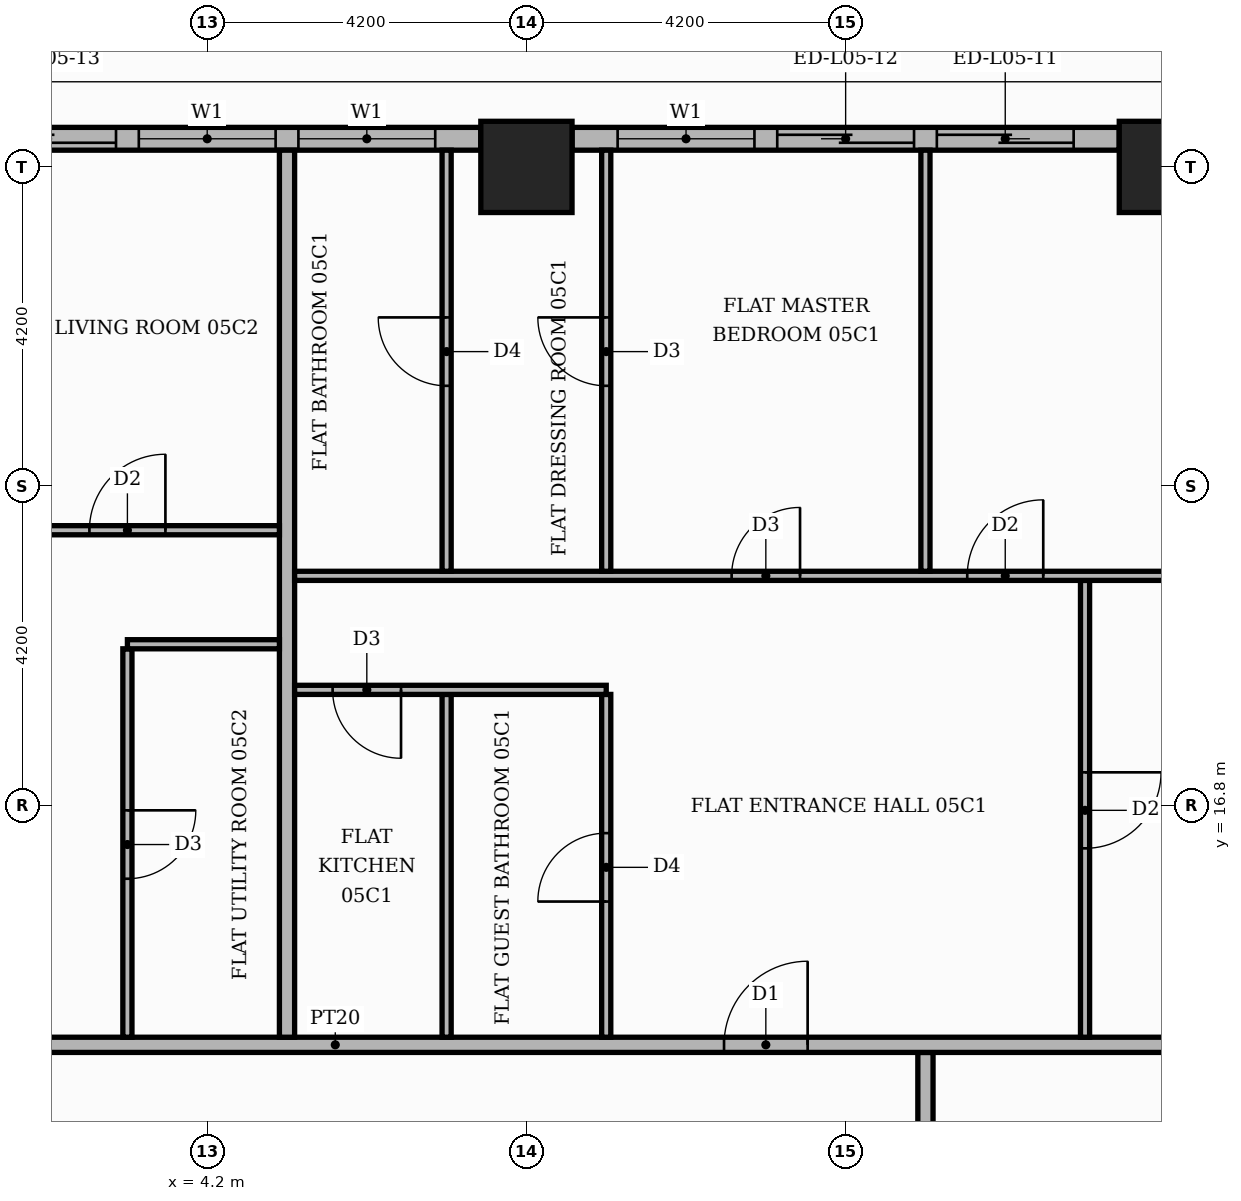
"""IFC4 building model, lengths in metres.
Left out: names, types, materials, properties, quantities, classifications, styles, units other than length and angle.
Written with IfcOpenShell. Run it as: python <this file> out.ifc"""

import sys

from ifc_helpers import new_model, si_unit, direction, frame, frame_2d, origin, origin_2d, place, context, subcontext, project, spatial, rectangle, extrude, element, fill, save


model = new_model("IFC4")
c1 = context("Model", 3, precision=1e-05, world=origin(), true_north=direction((0.0, 1.0)))
c2 = subcontext(c1, "Body", "Model", "MODEL_VIEW")
j1 = project(units=[si_unit("LENGTHUNIT", "METRE"), si_unit("PLANEANGLEUNIT", "RADIAN")], contexts=[c1])
p1 = place(None, origin())
s1 = spatial("IfcSite", under=j1, at=p1, CompositionType="ELEMENT")
p2 = place(p1, origin())
s2 = spatial("IfcBuilding", under=s1, at=p2, CompositionType="ELEMENT")
p3 = place(p2, frame((0.0, 0.0, 27.0)))
s3 = spatial("IfcBuildingStorey", under=s2, at=p3, CompositionType="ELEMENT", Elevation=27.0)
for number, where, z_axis, x_axis in (
    (1, (8.4, 25.2, 0.0), (0.0, 0.0, 1.0), (1.0, 0.0, 0.0)),
    (2, (16.8, 25.2, 0.0), (0.0, 0.0, 1.0), (1.0, 0.0, 0.0)),
):
    element("IfcColumn", number, at=place(p3, frame(where, z_axis=z_axis, x_axis=x_axis)), inside=s3, PredefinedType="COLUMN", context=c2, shape_type="SweptSolid", body=[
        extrude(rectangle(XDim=1.2, YDim=1.2, at=origin_2d()), origin(), (0.0, 0.0, 1.0), 3.9),
    ])
p4 = place(p3, frame((16.2, 25.57, 0.0), z_axis=(0.0, 0.0, 1.0), x_axis=(-1.0, 0.0, 0.0)))
e3 = element("IfcWall", 3, at=p4, inside=s3, PredefinedType="STANDARD", context=c2, shape_type="SweptSolid", body=[
    extrude(rectangle(XDim=7.2, YDim=0.3, at=frame_2d((3.6, 0.0))), origin(), (0.0, 0.0, 1.0), 3.48),
])
p5 = place(p4, frame((0.6, 0.0, 0.0)))
e4 = element("IfcOpeningElement", 4, at=p5, cuts=e3, PredefinedType="OPENING", context=c2, shape_type="SweptSolid", body=[
    extrude(rectangle(XDim=1.8, YDim=2.4, at=frame_2d((0.9, 1.2))), frame((0.0, 0.16, 0.0), z_axis=(0.0, -1.0, 0.0), x_axis=(1.0, 0.0, 0.0)), (0.0, 0.0, 1.0), 0.32),
])
p6 = place(p4, frame((2.7, 0.0, 0.0)))
e5 = element("IfcOpeningElement", 5, at=p6, cuts=e3, PredefinedType="OPENING", context=c2, shape_type="SweptSolid", body=[
    extrude(rectangle(XDim=1.8, YDim=2.4, at=frame_2d((0.9, 1.2))), frame((0.0, 0.16, 0.0), z_axis=(0.0, -1.0, 0.0), x_axis=(1.0, 0.0, 0.0)), (0.0, 0.0, 1.0), 0.32),
])
p7 = place(p4, frame((4.8, 0.0, 0.9)))
e6 = element("IfcOpeningElement", 6, at=p7, cuts=e3, PredefinedType="OPENING", context=c2, shape_type="SweptSolid", body=[
    extrude(rectangle(XDim=1.8, YDim=2.1, at=frame_2d((0.9, 1.05))), frame((0.0, 0.16, 0.0), z_axis=(0.0, -1.0, 0.0), x_axis=(1.0, 0.0, 0.0)), (0.0, 0.0, 1.0), 0.32),
])
p8 = place(p3, frame((7.8, 25.57, 0.0), z_axis=(0.0, 0.0, 1.0), x_axis=(-1.0, 0.0, 0.0)))
e7 = element("IfcWall", 7, at=p8, inside=s3, PredefinedType="STANDARD", context=c2, shape_type="SweptSolid", body=[
    extrude(rectangle(XDim=7.2, YDim=0.3, at=frame_2d((3.6, 0.0))), origin(), (0.0, 0.0, 1.0), 3.48),
])
p9 = place(p8, frame((0.6, 0.0, 0.9)))
e8 = element("IfcOpeningElement", 8, at=p9, cuts=e7, PredefinedType="OPENING", context=c2, shape_type="SweptSolid", body=[
    extrude(rectangle(XDim=1.8, YDim=2.1, at=frame_2d((0.9, 1.05))), frame((0.0, 0.16, 0.0), z_axis=(0.0, -1.0, 0.0), x_axis=(1.0, 0.0, 0.0)), (0.0, 0.0, 1.0), 0.32),
])
p10 = place(p8, frame((2.7, 0.0, 0.9)))
e9 = element("IfcOpeningElement", 9, at=p10, cuts=e7, PredefinedType="OPENING", context=c2, shape_type="SweptSolid", body=[
    extrude(rectangle(XDim=1.8, YDim=2.1, at=frame_2d((0.9, 1.05))), frame((0.0, 0.16, 0.0), z_axis=(0.0, -1.0, 0.0), x_axis=(1.0, 0.0, 0.0)), (0.0, 0.0, 1.0), 0.32),
])
p11 = place(p8, frame((4.8, 0.0, 0.0)))
e10 = element("IfcOpeningElement", 10, at=p11, cuts=e7, PredefinedType="OPENING", context=c2, shape_type="SweptSolid", body=[
    extrude(rectangle(XDim=1.8, YDim=2.4, at=frame_2d((0.9, 1.2))), frame((0.0, 0.16, 0.0), z_axis=(0.0, -1.0, 0.0), x_axis=(1.0, 0.0, 0.0)), (0.0, 0.0, 1.0), 0.32),
])
p12 = place(p3, frame((13.65, -5.15, 0.0), z_axis=(0.0, 0.0, 1.0), x_axis=(0.0, 1.0, 0.0)))
e11 = element("IfcWall", 11, at=p12, inside=s3, PredefinedType="PARTITIONING", context=c2, shape_type="SweptSolid", body=[
    extrude(rectangle(XDim=18.7, YDim=0.2, at=frame_2d((9.35, 0.0))), origin(), (0.0, 0.0, 1.0), 3.48),
])
p13 = place(p12, frame((3.55, 0.0, 0.0)))
e12 = element("IfcOpeningElement", 12, at=p13, cuts=e11, PredefinedType="OPENING", context=c2, shape_type="SweptSolid", body=[
    extrude(rectangle(XDim=1.1, YDim=2.4, at=frame_2d((0.55, 1.2))), frame((0.0, 0.11, 0.0), z_axis=(0.0, -1.0, 0.0), x_axis=(1.0, 0.0, 0.0)), (0.0, 0.0, 1.0), 0.22),
])
p14 = place(p3, frame((-13.65, 13.65, 0.0), z_axis=(0.0, 0.0, 1.0), x_axis=(1.0, 0.0, 0.0)))
e13 = element("IfcWall", 13, at=p14, inside=s3, PredefinedType="PARTITIONING", context=c2, shape_type="SweptSolid", body=[
    extrude(rectangle(XDim=39.07, YDim=0.2, at=frame_2d((19.535, 0.0))), origin(), (0.0, 0.0, 1.0), 3.48),
])
p15 = place(p14, frame((24.65, 0.0, 0.0)))
e14 = element("IfcOpeningElement", 14, at=p15, cuts=e13, PredefinedType="OPENING", context=c2, shape_type="SweptSolid", body=[
    extrude(rectangle(XDim=1.1, YDim=2.4, at=frame_2d((0.55, 1.2))), frame((0.0, 0.11, 0.0), z_axis=(0.0, -1.0, 0.0), x_axis=(1.0, 0.0, 0.0)), (0.0, 0.0, 1.0), 0.22),
])
p16 = place(p14, frame((14.15, 0.0, 0.0)))
e15 = element("IfcOpeningElement", 15, at=p16, cuts=e13, PredefinedType="OPENING", context=c2, shape_type="SweptSolid", body=[
    extrude(rectangle(XDim=1.1, YDim=2.4, at=frame_2d((0.55, 1.2))), frame((0.0, 0.11, 0.0), z_axis=(0.0, -1.0, 0.0), x_axis=(1.0, 0.0, 0.0)), (0.0, 0.0, 1.0), 0.22),
])
p17 = place(p3, frame((3.15, 13.75, 0.0), z_axis=(0.0, 0.0, 1.0), x_axis=(0.0, 1.0, 0.0)))
e16 = element("IfcWall", 16, at=p17, inside=s3, PredefinedType="PARTITIONING", context=c2, shape_type="SweptSolid", body=[
    extrude(rectangle(XDim=5.11, YDim=0.12, at=frame_2d((2.555, 0.0))), origin(), (0.0, 0.0, 1.0), 3.48),
])
p18 = place(p17, frame((2.085, 0.0, 0.0)))
e17 = element("IfcOpeningElement", 17, at=p18, cuts=e16, PredefinedType="OPENING", context=c2, shape_type="SweptSolid", body=[
    extrude(rectangle(XDim=0.9, YDim=2.1, at=frame_2d((0.45, 1.05))), frame((0.0, 0.07, 0.0), z_axis=(0.0, -1.0, 0.0), x_axis=(1.0, 0.0, 0.0)), (0.0, 0.0, 1.0), 0.14),
])
p19 = place(p3, frame((5.25, 13.75, 0.0), z_axis=(0.0, 0.0, 1.0), x_axis=(0.0, 1.0, 0.0)))
e18 = element("IfcWall", 18, at=p19, inside=s3, PredefinedType="PARTITIONING", context=c2, shape_type="SweptSolid", body=[
    extrude(rectangle(XDim=11.67, YDim=0.2, at=frame_2d((5.835, 0.0))), origin(), (0.0, 0.0, 1.0), 3.48),
])
p20 = place(p3, frame((7.35, 13.75, 0.0), z_axis=(0.0, 0.0, 1.0), x_axis=(0.0, 1.0, 0.0)))
e19 = element("IfcWall", 19, at=p20, inside=s3, PredefinedType="PARTITIONING", context=c2, shape_type="SweptSolid", body=[
    extrude(rectangle(XDim=4.51, YDim=0.12, at=frame_2d((2.255, 0.0))), origin(), (0.0, 0.0, 1.0), 3.48),
])
p21 = place(p3, frame((9.45, 13.75, 0.0), z_axis=(0.0, 0.0, 1.0), x_axis=(0.0, 1.0, 0.0)))
e20 = element("IfcWall", 20, at=p21, inside=s3, PredefinedType="PARTITIONING", context=c2, shape_type="SweptSolid", body=[
    extrude(rectangle(XDim=4.51, YDim=0.12, at=frame_2d((2.255, 0.0))), origin(), (0.0, 0.0, 1.0), 3.48),
])
p22 = place(p21, frame((1.785, 0.0, 0.0)))
e21 = element("IfcOpeningElement", 21, at=p22, cuts=e20, PredefinedType="OPENING", context=c2, shape_type="SweptSolid", body=[
    extrude(rectangle(XDim=0.9, YDim=2.1, at=frame_2d((0.45, 1.05))), frame((0.0, 0.07, 0.0), z_axis=(0.0, -1.0, 0.0), x_axis=(1.0, 0.0, 0.0)), (0.0, 0.0, 1.0), 0.14),
])
p23 = place(p3, frame((15.75, 13.75, 0.0), z_axis=(0.0, 0.0, 1.0), x_axis=(0.0, 1.0, 0.0)))
e22 = element("IfcWall", 22, at=p23, inside=s3, PredefinedType="PARTITIONING", context=c2, shape_type="SweptSolid", body=[
    extrude(rectangle(XDim=6.01, YDim=0.12, at=frame_2d((3.005, 0.0))), origin(), (0.0, 0.0, 1.0), 3.48),
])
p24 = place(p23, frame((2.485, 0.0, 0.0)))
e23 = element("IfcOpeningElement", 23, at=p24, cuts=e22, PredefinedType="OPENING", context=c2, shape_type="SweptSolid", body=[
    extrude(rectangle(XDim=1.0, YDim=2.1, at=frame_2d((0.5, 1.05))), frame((0.0, 0.07, 0.0), z_axis=(0.0, -1.0, 0.0), x_axis=(1.0, 0.0, 0.0)), (0.0, 0.0, 1.0), 0.14),
])
p25 = place(p3, frame((5.35, 18.32, 0.0), z_axis=(0.0, 0.0, 1.0), x_axis=(1.0, 0.0, 0.0)))
e24 = element("IfcWall", 24, at=p25, inside=s3, PredefinedType="PARTITIONING", context=c2, shape_type="SweptSolid", body=[
    extrude(rectangle(XDim=4.1, YDim=0.12, at=frame_2d((2.05, 0.0))), origin(), (0.0, 0.0, 1.0), 3.48),
])
p26 = place(p25, frame((0.5, 0.0, 0.0)))
e25 = element("IfcOpeningElement", 25, at=p26, cuts=e24, PredefinedType="OPENING", context=c2, shape_type="SweptSolid", body=[
    extrude(rectangle(XDim=0.9, YDim=2.1, at=frame_2d((0.45, 1.05))), frame((0.0, 0.07, 0.0), z_axis=(0.0, -1.0, 0.0), x_axis=(1.0, 0.0, 0.0)), (0.0, 0.0, 1.0), 0.14),
])
p27 = place(p3, frame((3.15, 18.92, 0.0), z_axis=(0.0, 0.0, 1.0), x_axis=(1.0, 0.0, 0.0)))
e26 = element("IfcWall", 26, at=p27, inside=s3, PredefinedType="PARTITIONING", context=c2, shape_type="SweptSolid", body=[
    extrude(rectangle(XDim=2.0, YDim=0.12, at=frame_2d((1.0, 0.0))), origin(), (0.0, 0.0, 1.0), 3.48),
])
p28 = place(p3, frame((5.35, 19.82, 0.0), z_axis=(0.0, 0.0, 1.0), x_axis=(1.0, 0.0, 0.0)))
e27 = element("IfcWall", 27, at=p28, inside=s3, PredefinedType="PARTITIONING", context=c2, shape_type="SweptSolid", body=[
    extrude(rectangle(XDim=11.95, YDim=0.12, at=frame_2d((5.975, 0.0))), origin(), (0.0, 0.0, 1.0), 3.48),
])
p29 = place(p28, frame((8.85, 0.0, 0.0)))
e28 = element("IfcOpeningElement", 28, at=p29, cuts=e27, PredefinedType="OPENING", context=c2, shape_type="SweptSolid", body=[
    extrude(rectangle(XDim=1.0, YDim=2.1, at=frame_2d((0.5, 1.05))), frame((0.0, 0.07, 0.0), z_axis=(0.0, -1.0, 0.0), x_axis=(1.0, 0.0, 0.0)), (0.0, 0.0, 1.0), 0.14),
])
p30 = place(p28, frame((5.75, 0.0, 0.0)))
e29 = element("IfcOpeningElement", 29, at=p30, cuts=e27, PredefinedType="OPENING", context=c2, shape_type="SweptSolid", body=[
    extrude(rectangle(XDim=0.9, YDim=2.1, at=frame_2d((0.45, 1.05))), frame((0.0, 0.07, 0.0), z_axis=(0.0, -1.0, 0.0), x_axis=(1.0, 0.0, 0.0)), (0.0, 0.0, 1.0), 0.14),
])
p31 = place(p3, frame((7.35, 19.88, 0.0), z_axis=(0.0, 0.0, 1.0), x_axis=(0.0, 1.0, 0.0)))
e30 = element("IfcWall", 30, at=p31, inside=s3, PredefinedType="PARTITIONING", context=c2, shape_type="SweptSolid", body=[
    extrude(rectangle(XDim=5.54, YDim=0.12, at=frame_2d((2.77, 0.0))), origin(), (0.0, 0.0, 1.0), 3.48),
])
p32 = place(p31, frame((2.44, 0.0, 0.0)))
e31 = element("IfcOpeningElement", 31, at=p32, cuts=e30, PredefinedType="OPENING", context=c2, shape_type="SweptSolid", body=[
    extrude(rectangle(XDim=0.9, YDim=2.1, at=frame_2d((0.45, 1.05))), frame((0.0, 0.07, 0.0), z_axis=(0.0, -1.0, 0.0), x_axis=(1.0, 0.0, 0.0)), (0.0, 0.0, 1.0), 0.14),
])
p33 = place(p3, frame((9.45, 19.88, 0.0), z_axis=(0.0, 0.0, 1.0), x_axis=(0.0, 1.0, 0.0)))
e32 = element("IfcWall", 32, at=p33, inside=s3, PredefinedType="PARTITIONING", context=c2, shape_type="SweptSolid", body=[
    extrude(rectangle(XDim=5.54, YDim=0.12, at=frame_2d((2.77, 0.0))), origin(), (0.0, 0.0, 1.0), 3.48),
])
p34 = place(p33, frame((2.44, 0.0, 0.0)))
e33 = element("IfcOpeningElement", 33, at=p34, cuts=e32, PredefinedType="OPENING", context=c2, shape_type="SweptSolid", body=[
    extrude(rectangle(XDim=0.9, YDim=2.1, at=frame_2d((0.45, 1.05))), frame((0.0, 0.07, 0.0), z_axis=(0.0, -1.0, 0.0), x_axis=(1.0, 0.0, 0.0)), (0.0, 0.0, 1.0), 0.14),
])
p35 = place(p3, frame((13.65, 19.88, 0.0), z_axis=(0.0, 0.0, 1.0), x_axis=(0.0, 1.0, 0.0)))
e34 = element("IfcWall", 34, at=p35, inside=s3, PredefinedType="PARTITIONING", context=c2, shape_type="SweptSolid", body=[
    extrude(rectangle(XDim=5.54, YDim=0.12, at=frame_2d((2.77, 0.0))), origin(), (0.0, 0.0, 1.0), 3.48),
])
p36 = place(p3, frame((-13.55, 20.42, 0.0), z_axis=(0.0, 0.0, 1.0), x_axis=(1.0, 0.0, 0.0)))
e35 = element("IfcWall", 35, at=p36, inside=s3, PredefinedType="PARTITIONING", context=c2, shape_type="SweptSolid", body=[
    extrude(rectangle(XDim=18.7, YDim=0.12, at=frame_2d((9.35, 0.0))), origin(), (0.0, 0.0, 1.0), 3.48),
])
p37 = place(p36, frame((16.2, 0.0, 0.0)))
e36 = element("IfcOpeningElement", 36, at=p37, cuts=e35, PredefinedType="OPENING", context=c2, shape_type="SweptSolid", body=[
    extrude(rectangle(XDim=1.0, YDim=2.1, at=frame_2d((0.5, 1.05))), frame((0.0, 0.07, 0.0), z_axis=(0.0, -1.0, 0.0), x_axis=(1.0, 0.0, 0.0)), (0.0, 0.0, 1.0), 0.14),
])
p38 = place(p36, frame((12.05, 0.0, 0.0)))
e37 = element("IfcOpeningElement", 37, at=p38, cuts=e35, PredefinedType="OPENING", context=c2, shape_type="SweptSolid", body=[
    extrude(rectangle(XDim=0.9, YDim=2.1, at=frame_2d((0.45, 1.05))), frame((0.0, 0.07, 0.0), z_axis=(0.0, -1.0, 0.0), x_axis=(1.0, 0.0, 0.0)), (0.0, 0.0, 1.0), 0.14),
])
p39 = place(p36, frame((3.65, 0.0, 0.0)))
e38 = element("IfcOpeningElement", 38, at=p39, cuts=e35, PredefinedType="OPENING", context=c2, shape_type="SweptSolid", body=[
    extrude(rectangle(XDim=0.9, YDim=2.1, at=frame_2d((0.45, 1.05))), frame((0.0, 0.07, 0.0), z_axis=(0.0, -1.0, 0.0), x_axis=(1.0, 0.0, 0.0)), (0.0, 0.0, 1.0), 0.14),
])
p40 = place(p5, origin())
e39 = element("IfcDoor", 39, at=p40, inside=s3, OperationType="SLIDING_TO_LEFT", PredefinedType="DOOR", context=c2, shape_type="SweptSolid", body=[
    extrude(rectangle(XDim=1.8, YDim=2.4, at=frame_2d((0.9, 1.2))), frame((0.0, 0.025, 0.0), z_axis=(0.0, -1.0, 0.0), x_axis=(1.0, 0.0, 0.0)), (0.0, 0.0, 1.0), 0.05),
])
fill(e4, e39)
p41 = place(p6, origin())
e40 = element("IfcDoor", 40, at=p41, inside=s3, OperationType="SLIDING_TO_RIGHT", PredefinedType="DOOR", context=c2, shape_type="SweptSolid", body=[
    extrude(rectangle(XDim=1.8, YDim=2.4, at=frame_2d((0.9, 1.2))), frame((0.0, 0.025, 0.0), z_axis=(0.0, -1.0, 0.0), x_axis=(1.0, 0.0, 0.0)), (0.0, 0.0, 1.0), 0.05),
])
fill(e5, e40)
p42 = place(p7, origin())
e41 = element("IfcWindow", 41, at=p42, inside=s3, PartitioningType="SINGLE_PANEL", PredefinedType="WINDOW", context=c2, shape_type="SweptSolid", body=[
    extrude(rectangle(XDim=1.8, YDim=2.1, at=frame_2d((0.9, 1.05))), frame((0.0, 0.03, 0.0), z_axis=(0.0, -1.0, 0.0), x_axis=(1.0, 0.0, 0.0)), (0.0, 0.0, 1.0), 0.06),
])
fill(e6, e41)
p43 = place(p9, origin())
e42 = element("IfcWindow", 42, at=p43, inside=s3, PartitioningType="SINGLE_PANEL", PredefinedType="WINDOW", context=c2, shape_type="SweptSolid", body=[
    extrude(rectangle(XDim=1.8, YDim=2.1, at=frame_2d((0.9, 1.05))), frame((0.0, 0.03, 0.0), z_axis=(0.0, -1.0, 0.0), x_axis=(1.0, 0.0, 0.0)), (0.0, 0.0, 1.0), 0.06),
])
fill(e8, e42)
p44 = place(p10, origin())
e43 = element("IfcWindow", 43, at=p44, inside=s3, PartitioningType="SINGLE_PANEL", PredefinedType="WINDOW", context=c2, shape_type="SweptSolid", body=[
    extrude(rectangle(XDim=1.8, YDim=2.1, at=frame_2d((0.9, 1.05))), frame((0.0, 0.03, 0.0), z_axis=(0.0, -1.0, 0.0), x_axis=(1.0, 0.0, 0.0)), (0.0, 0.0, 1.0), 0.06),
])
fill(e9, e43)
p45 = place(p11, origin())
e44 = element("IfcDoor", 44, at=p45, inside=s3, OperationType="SLIDING_TO_RIGHT", PredefinedType="DOOR", context=c2, shape_type="SweptSolid", body=[
    extrude(rectangle(XDim=1.8, YDim=2.4, at=frame_2d((0.9, 1.2))), frame((0.0, 0.025, 0.0), z_axis=(0.0, -1.0, 0.0), x_axis=(1.0, 0.0, 0.0)), (0.0, 0.0, 1.0), 0.05),
])
fill(e10, e44)
p46 = place(p15, origin())
e45 = element("IfcDoor", 45, at=p46, inside=s3, OperationType="SINGLE_SWING_RIGHT", PredefinedType="DOOR", context=c2, shape_type="SweptSolid", body=[
    extrude(rectangle(XDim=1.1, YDim=2.4, at=frame_2d((0.55, 1.2))), frame((0.0, 0.025, 0.0), z_axis=(0.0, -1.0, 0.0), x_axis=(1.0, 0.0, 0.0)), (0.0, 0.0, 1.0), 0.05),
])
fill(e14, e45)
p47 = place(p24, frame((1.0, 0.0, 0.0), z_axis=(0.0, 0.0, 1.0), x_axis=(-1.0, 0.0, 0.0)))
e46 = element("IfcDoor", 46, at=p47, inside=s3, OperationType="SINGLE_SWING_RIGHT", PredefinedType="DOOR", context=c2, shape_type="SweptSolid", body=[
    extrude(rectangle(XDim=1.0, YDim=2.1, at=frame_2d((0.5, 1.05))), frame((0.0, 0.025, 0.0), z_axis=(0.0, -1.0, 0.0), x_axis=(1.0, 0.0, 0.0)), (0.0, 0.0, 1.0), 0.05),
])
fill(e23, e46)
p48 = place(p22, origin())
e47 = element("IfcDoor", 47, at=p48, inside=s3, OperationType="SINGLE_SWING_LEFT", PredefinedType="DOOR", context=c2, shape_type="SweptSolid", body=[
    extrude(rectangle(XDim=0.9, YDim=2.1, at=frame_2d((0.45, 1.05))), frame((0.0, 0.025, 0.0), z_axis=(0.0, -1.0, 0.0), x_axis=(1.0, 0.0, 0.0)), (0.0, 0.0, 1.0), 0.05),
])
fill(e21, e47)
p49 = place(p26, frame((0.9, 0.0, 0.0), z_axis=(0.0, 0.0, 1.0), x_axis=(-1.0, 0.0, 0.0)))
e48 = element("IfcDoor", 48, at=p49, inside=s3, OperationType="SINGLE_SWING_RIGHT", PredefinedType="DOOR", context=c2, shape_type="SweptSolid", body=[
    extrude(rectangle(XDim=0.9, YDim=2.1, at=frame_2d((0.45, 1.05))), frame((0.0, 0.025, 0.0), z_axis=(0.0, -1.0, 0.0), x_axis=(1.0, 0.0, 0.0)), (0.0, 0.0, 1.0), 0.05),
])
fill(e25, e48)
p50 = place(p29, origin())
e49 = element("IfcDoor", 49, at=p50, inside=s3, OperationType="SINGLE_SWING_RIGHT", PredefinedType="DOOR", context=c2, shape_type="SweptSolid", body=[
    extrude(rectangle(XDim=1.0, YDim=2.1, at=frame_2d((0.5, 1.05))), frame((0.0, 0.025, 0.0), z_axis=(0.0, -1.0, 0.0), x_axis=(1.0, 0.0, 0.0)), (0.0, 0.0, 1.0), 0.05),
])
fill(e28, e49)
p51 = place(p30, origin())
e50 = element("IfcDoor", 50, at=p51, inside=s3, OperationType="SINGLE_SWING_RIGHT", PredefinedType="DOOR", context=c2, shape_type="SweptSolid", body=[
    extrude(rectangle(XDim=0.9, YDim=2.1, at=frame_2d((0.45, 1.05))), frame((0.0, 0.025, 0.0), z_axis=(0.0, -1.0, 0.0), x_axis=(1.0, 0.0, 0.0)), (0.0, 0.0, 1.0), 0.05),
])
fill(e29, e50)
p52 = place(p34, origin())
e51 = element("IfcDoor", 51, at=p52, inside=s3, OperationType="SINGLE_SWING_RIGHT", PredefinedType="DOOR", context=c2, shape_type="SweptSolid", body=[
    extrude(rectangle(XDim=0.9, YDim=2.1, at=frame_2d((0.45, 1.05))), frame((0.0, 0.025, 0.0), z_axis=(0.0, -1.0, 0.0), x_axis=(1.0, 0.0, 0.0)), (0.0, 0.0, 1.0), 0.05),
])
fill(e33, e51)
p53 = place(p32, origin())
e52 = element("IfcDoor", 52, at=p53, inside=s3, OperationType="SINGLE_SWING_RIGHT", PredefinedType="DOOR", context=c2, shape_type="SweptSolid", body=[
    extrude(rectangle(XDim=0.9, YDim=2.1, at=frame_2d((0.45, 1.05))), frame((0.0, 0.025, 0.0), z_axis=(0.0, -1.0, 0.0), x_axis=(1.0, 0.0, 0.0)), (0.0, 0.0, 1.0), 0.05),
])
fill(e31, e52)
p54 = place(p18, frame((0.9, 0.0, 0.0), z_axis=(0.0, 0.0, 1.0), x_axis=(-1.0, 0.0, 0.0)))
e53 = element("IfcDoor", 53, at=p54, inside=s3, OperationType="SINGLE_SWING_RIGHT", PredefinedType="DOOR", context=c2, shape_type="SweptSolid", body=[
    extrude(rectangle(XDim=0.9, YDim=2.1, at=frame_2d((0.45, 1.05))), frame((0.0, 0.025, 0.0), z_axis=(0.0, -1.0, 0.0), x_axis=(1.0, 0.0, 0.0)), (0.0, 0.0, 1.0), 0.05),
])
fill(e17, e53)
p55 = place(p37, origin())
e54 = element("IfcDoor", 54, at=p55, inside=s3, OperationType="SINGLE_SWING_RIGHT", PredefinedType="DOOR", context=c2, shape_type="SweptSolid", body=[
    extrude(rectangle(XDim=1.0, YDim=2.1, at=frame_2d((0.5, 1.05))), frame((0.0, 0.025, 0.0), z_axis=(0.0, -1.0, 0.0), x_axis=(1.0, 0.0, 0.0)), (0.0, 0.0, 1.0), 0.05),
])
fill(e36, e54)
save(model, sys.argv[1])
